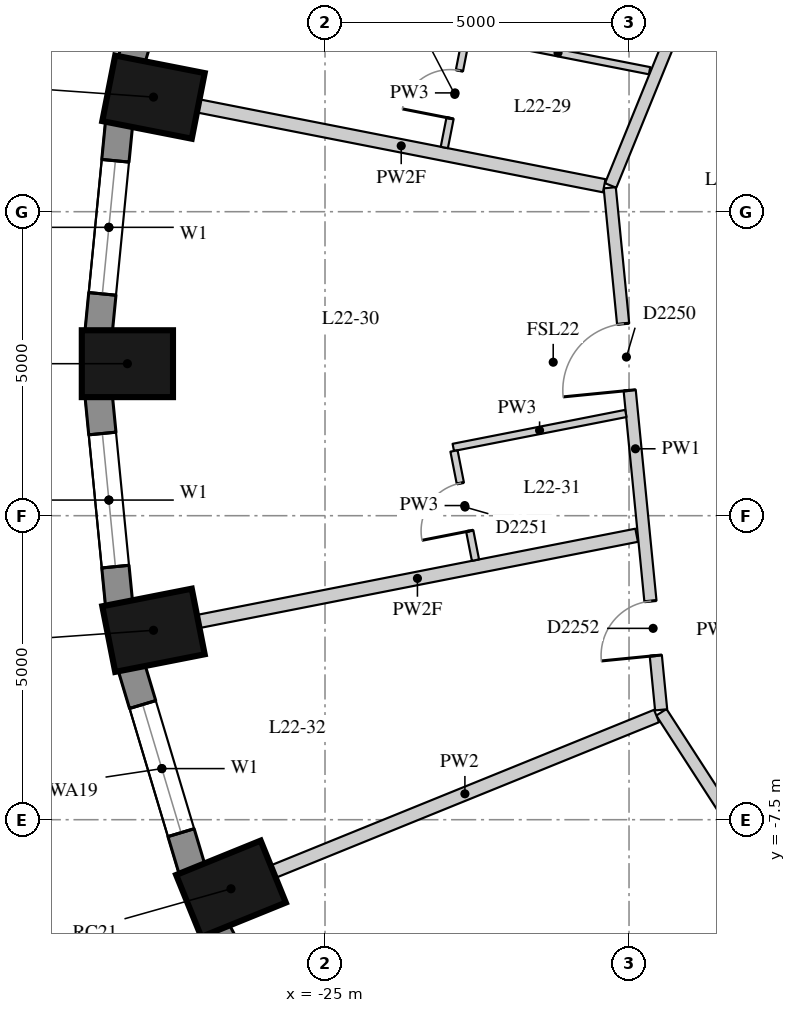
"""IFC4 building model, lengths in metres.
Left out: names, types, materials, properties, quantities, classifications, styles, units other than length and angle.
Written with IfcOpenShell. Run it as: python <this file> out.ifc"""

import sys

from ifc_helpers import new_model, si_unit, direction, frame, frame_2d, origin, origin_2d, place, context, subcontext, project, spatial, rectangle, extrude, element, fill, save


model = new_model("IFC4")
c1 = context("Model", 3, precision=1e-05, world=origin(), true_north=direction((0.0, 1.0)))
c2 = subcontext(c1, "Body", "Model", "MODEL_VIEW")
j1 = project(units=[si_unit("LENGTHUNIT", "METRE"), si_unit("PLANEANGLEUNIT", "RADIAN")], contexts=[c1])
p1 = place(None, origin())
s1 = spatial("IfcSite", under=j1, at=p1, CompositionType="ELEMENT")
p2 = place(p1, origin())
s2 = spatial("IfcBuilding", under=s1, at=p2, CompositionType="ELEMENT")
p3 = place(p2, frame((0.0, 0.0, 81.1)))
s3 = spatial("IfcBuildingStorey", under=s2, at=p3, CompositionType="ELEMENT", Elevation=81.1)
for number, where, z_axis, x_axis in (
    (1, (-27.821, 4.385, 0.0), (0.0, 0.0, 1.0), (-0.981, 0.193, 0.0)),
    (2, (-28.25, 0.0, 0.0), (0.0, 0.0, 1.0), (-1.0, 0.0, 0.0)),
    (3, (-27.821, -4.385, 0.0), (0.0, 0.0, 1.0), (-0.981, -0.193, 0.0)),
    (4, (-26.546, -8.636, 0.0), (0.0, 0.0, 1.0), (-0.927, -0.376, 0.0)),
):
    element("IfcColumn", number, at=place(p3, frame(where, z_axis=z_axis, x_axis=x_axis)), inside=s3, PredefinedType="COLUMN", context=c2, shape_type="SweptSolid", body=[
        extrude(rectangle(XDim=1.5, YDim=1.1, at=origin_2d()), origin(), (0.0, 0.0, 1.0), 3.3),
    ])
p4 = place(p3, frame((-27.185, 8.323, 0.0), z_axis=(0.0, 0.0, 1.0), x_axis=(-0.287064133733, -0.957911364963, 0.0)))
e5 = element("IfcWall", 5, at=p4, inside=s3, PredefinedType="SOLIDWALL", context=c2, shape_type="SweptSolid", body=[
    extrude(rectangle(XDim=3.473, YDim=0.45, at=frame_2d((1.737, 0.0))), origin(), (0.0, 0.0, 1.0), 2.85),
])
p5 = place(p4, frame((0.637, 0.0, 0.4)))
e6 = element("IfcOpeningElement", 6, at=p5, cuts=e5, PredefinedType="OPENING", context=c2, shape_type="SweptSolid", body=[
    extrude(rectangle(XDim=2.2, YDim=1.75, at=frame_2d((1.1, 0.875))), frame((0.0, 0.235, 0.0), z_axis=(0.0, -1.0, 0.0), x_axis=(1.0, 0.0, 0.0)), (0.0, 0.0, 1.0), 0.47),
])
p6 = place(p3, frame((-28.387, 3.956, 0.0), z_axis=(0.0, 0.0, 1.0), x_axis=(-0.097389581596, -0.995246336038, 0.0)))
e7 = element("IfcWall", 7, at=p6, inside=s3, PredefinedType="SOLIDWALL", context=c2, shape_type="SweptSolid", body=[
    extrude(rectangle(XDim=3.442, YDim=0.45, at=frame_2d((1.721, 0.0))), origin(), (0.0, 0.0, 1.0), 2.85),
])
p7 = place(p6, frame((0.621, 0.0, 0.4)))
e8 = element("IfcOpeningElement", 8, at=p7, cuts=e7, PredefinedType="OPENING", context=c2, shape_type="SweptSolid", body=[
    extrude(rectangle(XDim=2.2, YDim=1.75, at=frame_2d((1.1, 0.875))), frame((0.0, 0.235, 0.0), z_axis=(0.0, -1.0, 0.0), x_axis=(1.0, 0.0, 0.0)), (0.0, 0.0, 1.0), 0.47),
])
p8 = place(p3, frame((-28.722, -0.53, 0.0), z_axis=(0.0, 0.0, 1.0), x_axis=(0.097389581596, -0.995246336038, 0.0)))
e9 = element("IfcWall", 9, at=p8, inside=s3, PredefinedType="SOLIDWALL", context=c2, shape_type="SweptSolid", body=[
    extrude(rectangle(XDim=3.442, YDim=0.45, at=frame_2d((1.721, 0.0))), origin(), (0.0, 0.0, 1.0), 2.85),
])
p9 = place(p8, frame((0.621, 0.0, 0.4)))
e10 = element("IfcOpeningElement", 10, at=p9, cuts=e9, PredefinedType="OPENING", context=c2, shape_type="SweptSolid", body=[
    extrude(rectangle(XDim=2.2, YDim=1.75, at=frame_2d((1.1, 0.875))), frame((0.0, 0.235, 0.0), z_axis=(0.0, -1.0, 0.0), x_axis=(1.0, 0.0, 0.0)), (0.0, 0.0, 1.0), 0.47),
])
p10 = place(p3, frame((-28.182, -4.996, 0.0), z_axis=(0.0, 0.0, 1.0), x_axis=(0.287064133733, -0.957911364963, 0.0)))
e11 = element("IfcWall", 11, at=p10, inside=s3, PredefinedType="SOLIDWALL", context=c2, shape_type="SweptSolid", body=[
    extrude(rectangle(XDim=3.473, YDim=0.45, at=frame_2d((1.737, 0.0))), origin(), (0.0, 0.0, 1.0), 2.85),
])
p11 = place(p10, frame((0.637, 0.0, 0.4)))
e12 = element("IfcOpeningElement", 12, at=p11, cuts=e11, PredefinedType="OPENING", context=c2, shape_type="SweptSolid", body=[
    extrude(rectangle(XDim=2.2, YDim=1.75, at=frame_2d((1.1, 0.875))), frame((0.0, 0.235, 0.0), z_axis=(0.0, -1.0, 0.0), x_axis=(1.0, 0.0, 0.0)), (0.0, 0.0, 1.0), 0.47),
])
p12 = place(p3, frame((-26.786, -9.305, 0.0), z_axis=(0.0, 0.0, 1.0), x_axis=(0.462492775226, -0.886623050041, 0.0)))
e13 = element("IfcWall", 13, at=p12, inside=s3, PredefinedType="SOLIDWALL", context=c2, shape_type="SweptSolid", body=[
    extrude(rectangle(XDim=3.532, YDim=0.45, at=frame_2d((1.766, 0.0))), origin(), (0.0, 0.0, 1.0), 2.85),
])
p13 = place(p12, frame((0.666, 0.0, 0.4)))
e14 = element("IfcOpeningElement", 14, at=p13, cuts=e13, PredefinedType="OPENING", context=c2, shape_type="SweptSolid", body=[
    extrude(rectangle(XDim=2.2, YDim=1.75, at=frame_2d((1.1, 0.875))), frame((0.0, 0.235, 0.0), z_axis=(0.0, -1.0, 0.0), x_axis=(1.0, 0.0, 0.0)), (0.0, 0.0, 1.0), 0.47),
])
p14 = place(p3, frame((-16.132, -10.895, 0.0), z_axis=(0.0, 0.0, 1.0), x_axis=(-0.54275375647, 0.839891873897, 0.0)))
e15 = element("IfcWall", 15, at=p14, inside=s3, PredefinedType="PARTITIONING", context=c2, shape_type="SweptSolid", body=[
    extrude(rectangle(XDim=6.146, YDim=0.2, at=frame_2d((3.073, 0.0))), origin(), (0.0, 0.0, 1.0), 2.85),
])
p15 = place(p14, frame((0.22, 0.0, 0.0)))
e16 = element("IfcOpeningElement", 16, at=p15, cuts=e15, PredefinedType="OPENING", context=c2, shape_type="SweptSolid", body=[
    extrude(rectangle(XDim=1.1, YDim=2.1, at=frame_2d((0.55, 1.05))), frame((0.0, 0.11, 0.0), z_axis=(0.0, -1.0, 0.0), x_axis=(1.0, 0.0, 0.0)), (0.0, 0.0, 1.0), 0.22),
])
p16 = place(p3, frame((-19.472, -5.693, 0.0), z_axis=(0.0, 0.0, 1.0), x_axis=(-0.097987963337, 0.995187599923, 0.0)))
e17 = element("IfcWall", 17, at=p16, inside=s3, PredefinedType="PARTITIONING", context=c2, shape_type="SweptSolid", body=[
    extrude(rectangle(XDim=8.628, YDim=0.2, at=frame_2d((4.314, 0.0))), origin(), (0.0, 0.0, 1.0), 2.85),
])
p17 = place(p16, frame((5.28, 0.0, 0.0)))
e18 = element("IfcOpeningElement", 18, at=p17, cuts=e17, PredefinedType="OPENING", context=c2, shape_type="SweptSolid", body=[
    extrude(rectangle(XDim=1.1, YDim=2.1, at=frame_2d((0.55, 1.05))), frame((0.0, 0.11, 0.0), z_axis=(0.0, -1.0, 0.0), x_axis=(1.0, 0.0, 0.0)), (0.0, 0.0, 1.0), 0.22),
])
p18 = place(p16, frame((0.896, 0.0, 0.0)))
e19 = element("IfcOpeningElement", 19, at=p18, cuts=e17, PredefinedType="OPENING", context=c2, shape_type="SweptSolid", body=[
    extrude(rectangle(XDim=0.9, YDim=2.1, at=frame_2d((0.45, 1.05))), frame((0.0, 0.11, 0.0), z_axis=(0.0, -1.0, 0.0), x_axis=(1.0, 0.0, 0.0)), (0.0, 0.0, 1.0), 0.22),
])
p19 = place(p3, frame((-20.302, 2.931, 0.0), z_axis=(0.0, 0.0, 1.0), x_axis=(0.377348916571, 0.926071160961, 0.0)))
e20 = element("IfcWall", 20, at=p19, inside=s3, PredefinedType="PARTITIONING", context=c2, shape_type="SweptSolid", body=[
    extrude(rectangle(XDim=5.962, YDim=0.2, at=frame_2d((2.981, 0.0))), origin(), (0.0, 0.0, 1.0), 2.85),
])
p20 = place(p3, frame((-27.085, 4.24, 0.0), z_axis=(0.0, 0.0, 1.0), x_axis=(0.981200805451, -0.192989583608, 0.0)))
e21 = element("IfcWall", 21, at=p20, inside=s3, PredefinedType="PARTITIONING", context=c2, shape_type="SweptSolid", body=[
    extrude(rectangle(XDim=6.805, YDim=0.22, at=frame_2d((3.402, 0.0))), origin(), (0.0, 0.0, 1.0), 2.3),
])
p21 = place(p3, frame((-27.085, -4.24, 0.0), z_axis=(0.0, 0.0, 1.0), x_axis=(0.981198066788, 0.193003507042, 0.0)))
e22 = element("IfcWall", 22, at=p21, inside=s3, PredefinedType="PARTITIONING", context=c2, shape_type="SweptSolid", body=[
    extrude(rectangle(XDim=7.348, YDim=0.22, at=frame_2d((3.674, 0.0))), origin(), (0.0, 0.0, 1.0), 2.3),
])
p22 = place(p3, frame((-25.851, -8.354, 0.0), z_axis=(0.0, 0.0, 1.0), x_axis=(0.926556482368, 0.376155665892, 0.0)))
e23 = element("IfcWall", 23, at=p22, inside=s3, PredefinedType="PARTITIONING", context=c2, shape_type="SweptSolid", body=[
    extrude(rectangle(XDim=6.804, YDim=0.22, at=frame_2d((3.402, 0.0))), origin(), (0.0, 0.0, 1.0), 2.85),
])
p23 = place(p3, frame((-19.662, 4.819, 0.0), z_axis=(0.0, 0.0, 1.0), x_axis=(-0.981227049162, 0.192856106963, 0.0)))
e24 = element("IfcWall", 24, at=p23, inside=s3, PredefinedType="PARTITIONING", context=c2, shape_type="SweptSolid", body=[
    extrude(rectangle(XDim=3.069, YDim=0.12, at=frame_2d((1.534, 0.0))), origin(), (0.0, 0.0, 1.0), 2.85),
])
p24 = place(p3, frame((-20.052, -0.818, 0.0), z_axis=(0.0, 0.0, 1.0), x_axis=(-0.981205462312, -0.192965905613, 0.0)))
e25 = element("IfcWall", 25, at=p24, inside=s3, PredefinedType="PARTITIONING", context=c2, shape_type="SweptSolid", body=[
    extrude(rectangle(XDim=2.892, YDim=0.12, at=frame_2d((1.446, 0.0))), origin(), (0.0, 0.0, 1.0), 2.85),
])
p25 = place(p3, frame((-22.685, 5.352, 0.0), z_axis=(0.0, 0.0, 1.0), x_axis=(-0.192908160061, -0.981216816907, 0.0)))
e26 = element("IfcWall", 26, at=p25, inside=s3, PredefinedType="PARTITIONING", context=c2, shape_type="SweptSolid", body=[
    extrude(rectangle(XDim=1.83, YDim=0.12, at=frame_2d((0.915, 0.0))), origin(), (0.0, 0.0, 1.0), 2.85),
])
p26 = place(p25, frame((0.54, 0.0, 0.0)))
e27 = element("IfcOpeningElement", 27, at=p26, cuts=e26, PredefinedType="OPENING", context=c2, shape_type="SweptSolid", body=[
    extrude(rectangle(XDim=0.8, YDim=2.1, at=frame_2d((0.4, 1.05))), frame((0.0, 0.07, 0.0), z_axis=(0.0, -1.0, 0.0), x_axis=(1.0, 0.0, 0.0)), (0.0, 0.0, 1.0), 0.14),
])
p27 = place(p3, frame((-22.879, -1.435, 0.0), z_axis=(0.0, 0.0, 1.0), x_axis=(0.193036598643, -0.981191557029, 0.0)))
e28 = element("IfcWall", 28, at=p27, inside=s3, PredefinedType="PARTITIONING", context=c2, shape_type="SweptSolid", body=[
    extrude(rectangle(XDim=1.83, YDim=0.12, at=frame_2d((0.915, 0.0))), origin(), (0.0, 0.0, 1.0), 2.85),
])
p28 = place(p27, frame((0.54, 0.0, 0.0)))
e29 = element("IfcOpeningElement", 29, at=p28, cuts=e28, PredefinedType="OPENING", context=c2, shape_type="SweptSolid", body=[
    extrude(rectangle(XDim=0.8, YDim=2.1, at=frame_2d((0.4, 1.05))), frame((0.0, 0.07, 0.0), z_axis=(0.0, -1.0, 0.0), x_axis=(1.0, 0.0, 0.0)), (0.0, 0.0, 1.0), 0.14),
])
p29 = place(p7, origin())
e30 = element("IfcWindow", 30, at=p29, inside=s3, PartitioningType="SINGLE_PANEL", PredefinedType="WINDOW", context=c2, shape_type="SweptSolid", body=[
    extrude(rectangle(XDim=2.2, YDim=1.75, at=frame_2d((1.1, 0.875))), frame((0.0, 0.035, 0.0), z_axis=(0.0, -1.0, 0.0), x_axis=(1.0, 0.0, 0.0)), (0.0, 0.0, 1.0), 0.06),
])
fill(e8, e30)
p30 = place(p9, origin())
e31 = element("IfcWindow", 31, at=p30, inside=s3, PartitioningType="SINGLE_PANEL", PredefinedType="WINDOW", context=c2, shape_type="SweptSolid", body=[
    extrude(rectangle(XDim=2.2, YDim=1.75, at=frame_2d((1.1, 0.875))), frame((0.0, 0.035, 0.0), z_axis=(0.0, -1.0, 0.0), x_axis=(1.0, 0.0, 0.0)), (0.0, 0.0, 1.0), 0.06),
])
fill(e10, e31)
p31 = place(p11, origin())
e32 = element("IfcWindow", 32, at=p31, inside=s3, PartitioningType="SINGLE_PANEL", PredefinedType="WINDOW", context=c2, shape_type="SweptSolid", body=[
    extrude(rectangle(XDim=2.2, YDim=1.75, at=frame_2d((1.1, 0.875))), frame((0.0, 0.035, 0.0), z_axis=(0.0, -1.0, 0.0), x_axis=(1.0, 0.0, 0.0)), (0.0, 0.0, 1.0), 0.06),
])
fill(e12, e32)
p32 = place(p26, origin())
e33 = element("IfcDoor", 33, at=p32, inside=s3, OperationType="SINGLE_SWING_LEFT", PredefinedType="DOOR", context=c2, shape_type="SweptSolid", body=[
    extrude(rectangle(XDim=0.8, YDim=2.1, at=frame_2d((0.4, 1.05))), frame((0.0, 0.025, 0.0), z_axis=(0.0, -1.0, 0.0), x_axis=(1.0, 0.0, 0.0)), (0.0, 0.0, 1.0), 0.05),
])
fill(e27, e33)
p33 = place(p17, origin())
e34 = element("IfcDoor", 34, at=p33, inside=s3, OperationType="SINGLE_SWING_LEFT", PredefinedType="DOOR", context=c2, shape_type="SweptSolid", body=[
    extrude(rectangle(XDim=1.1, YDim=2.1, at=frame_2d((0.55, 1.05))), frame((0.0, 0.025, 0.0), z_axis=(0.0, -1.0, 0.0), x_axis=(1.0, 0.0, 0.0)), (0.0, 0.0, 1.0), 0.05),
])
fill(e18, e34)
p34 = place(p28, origin())
e35 = element("IfcDoor", 35, at=p34, inside=s3, OperationType="SINGLE_SWING_LEFT", PredefinedType="DOOR", context=c2, shape_type="SweptSolid", body=[
    extrude(rectangle(XDim=0.8, YDim=2.1, at=frame_2d((0.4, 1.05))), frame((0.0, 0.025, 0.0), z_axis=(0.0, -1.0, 0.0), x_axis=(1.0, 0.0, 0.0)), (0.0, 0.0, 1.0), 0.05),
])
fill(e29, e35)
p35 = place(p18, origin())
e36 = element("IfcDoor", 36, at=p35, inside=s3, OperationType="SINGLE_SWING_LEFT", PredefinedType="DOOR", context=c2, shape_type="SweptSolid", body=[
    extrude(rectangle(XDim=0.9, YDim=2.1, at=frame_2d((0.45, 1.05))), frame((0.0, 0.025, 0.0), z_axis=(0.0, -1.0, 0.0), x_axis=(1.0, 0.0, 0.0)), (0.0, 0.0, 1.0), 0.05),
])
fill(e19, e36)
save(model, sys.argv[1])
